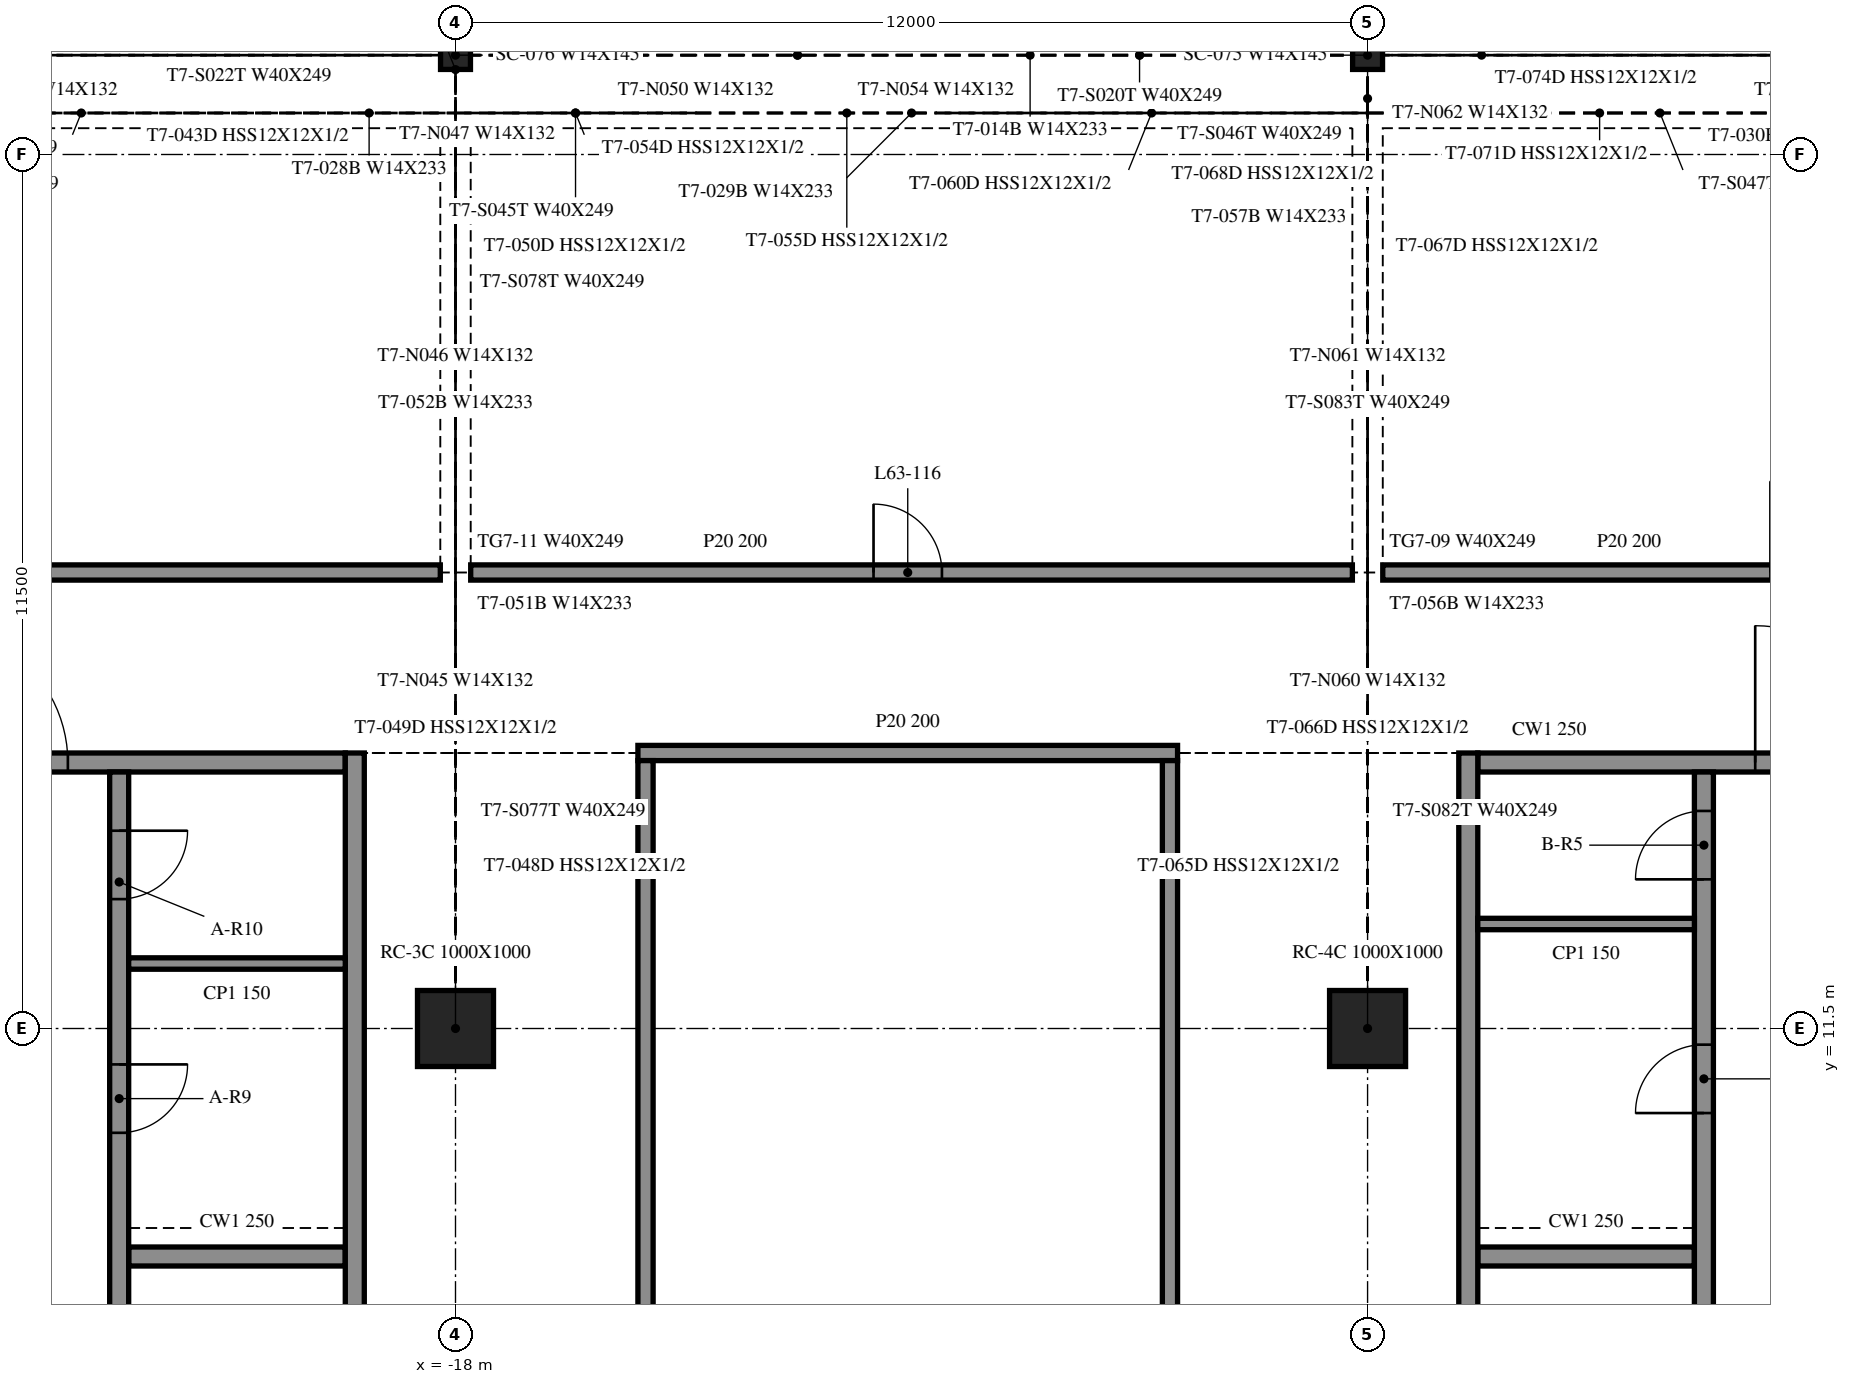
"""IFC4 building model, lengths in metres.
Left out: names, types, materials, properties, quantities, classifications, styles, units other than length and angle.
Written with IfcOpenShell. Run it as: python <this file> out.ifc"""

import sys

from ifc_helpers import new_model, si_unit, direction, frame, frame_2d, origin, origin_2d, place, context, subcontext, project, spatial, rectangle, i_section, extrude, element, fill, save


model = new_model("IFC4")
c1 = context("Model", 3, precision=1e-05, world=origin(), true_north=direction((0.0, 1.0)))
c2 = subcontext(c1, "Body", "Model", "MODEL_VIEW")
j1 = project(units=[si_unit("LENGTHUNIT", "METRE"), si_unit("PLANEANGLEUNIT", "RADIAN")], contexts=[c1])
p1 = place(None, origin())
s1 = spatial("IfcSite", under=j1, at=p1, CompositionType="ELEMENT")
p2 = place(p1, origin())
s2 = spatial("IfcBuilding", under=s1, at=p2, CompositionType="ELEMENT")
p3 = place(p2, frame((0.0, 0.0, 259.0)))
s3 = spatial("IfcBuildingStorey", under=s2, at=p3, CompositionType="ELEMENT", Elevation=259.0)
for number, where, z_axis, x_axis in (
    (1, (-18.0, 11.5, -0.4), (0.0, 0.0, 1.0), (1.0, 0.0, 0.0)),
    (2, (-6.0, 11.5, -0.4), (0.0, 0.0, 1.0), (1.0, 0.0, 0.0)),
):
    element("IfcColumn", number, at=place(p3, frame(where, z_axis=z_axis, x_axis=x_axis)), inside=s3, PredefinedType="COLUMN", context=c2, shape_type="SweptSolid", body=[
        extrude(rectangle(XDim=1.0, YDim=1.0, at=origin_2d()), origin(), (0.0, 0.0, 1.0), 4.36),
    ])
for number, where, z_axis, x_axis in (
    (3, (-6.0, 24.307, -0.4), (0.0, 0.0, 1.0), (1.0, 0.0, 0.0)),
    (4, (-18.0, 24.307, -0.4), (0.0, 0.0, 1.0), (1.0, 0.0, 0.0)),
):
    element("IfcColumn", number, at=place(p3, frame(where, z_axis=z_axis, x_axis=x_axis)), inside=s3, PredefinedType="COLUMN", context=c2, shape_type="SweptSolid", body=[
        extrude(i_section(OverallWidth=0.394, OverallDepth=0.376, WebThickness=0.017, FlangeThickness=0.028, at=origin_2d()), origin(), (0.0, 0.0, 1.0), 4.36),
    ])
p4 = place(p3, frame((-19.325, -9.125, 0.0), z_axis=(0.0, 0.0, 1.0), x_axis=(0.0, 1.0, 0.0)))
e5 = element("IfcWall", 5, at=p4, inside=s3, PredefinedType="SOLIDWALL", context=c2, shape_type="SweptSolid", body=[
    extrude(rectangle(XDim=24.25, YDim=0.25, at=frame_2d((12.125, 0.0))), origin(), (0.0, 0.0, 1.0), 3.96),
])
p5 = place(p3, frame((-28.55, 15.0, 0.0), z_axis=(0.0, 0.0, 1.0), x_axis=(1.0, 0.0, 0.0)))
e6 = element("IfcWall", 6, at=p5, inside=s3, PredefinedType="SOLIDWALL", context=c2, shape_type="SweptSolid", body=[
    extrude(rectangle(XDim=9.1, YDim=0.25, at=frame_2d((4.55, 0.0))), origin(), (0.0, 0.0, 1.0), 3.96),
])
p6 = place(p5, frame((3.65, 0.0, 0.0)))
e7 = element("IfcOpeningElement", 7, at=p6, cuts=e6, PredefinedType="OPENING", context=c2, shape_type="SweptSolid", body=[
    extrude(rectangle(XDim=1.8, YDim=2.1, at=frame_2d((0.9, 1.05))), frame((0.0, 0.135, 0.0), z_axis=(0.0, -1.0, 0.0), x_axis=(1.0, 0.0, 0.0)), (0.0, 0.0, 1.0), 0.27),
])
p7 = place(p3, frame((-22.425, 14.875, 0.0), z_axis=(0.0, 0.0, 1.0), x_axis=(0.0, -1.0, 0.0)))
e8 = element("IfcWall", 8, at=p7, inside=s3, PredefinedType="SOLIDWALL", context=c2, shape_type="SweptSolid", body=[
    extrude(rectangle(XDim=24.0, YDim=0.25, at=frame_2d((12.0, 0.0))), origin(), (0.0, 0.0, 1.0), 3.96),
])
p8 = place(p7, frame((15.225, 0.0, 0.0)))
e9 = element("IfcOpeningElement", 9, at=p8, cuts=e8, PredefinedType="OPENING", context=c2, shape_type="SweptSolid", body=[
    extrude(rectangle(XDim=0.9, YDim=2.1, at=frame_2d((0.45, 1.05))), frame((0.0, 0.135, 0.0), z_axis=(0.0, -1.0, 0.0), x_axis=(1.0, 0.0, 0.0)), (0.0, 0.0, 1.0), 0.27),
])
p9 = place(p7, frame((11.425, 0.0, 0.0)))
e10 = element("IfcOpeningElement", 10, at=p9, cuts=e8, PredefinedType="OPENING", context=c2, shape_type="SweptSolid", body=[
    extrude(rectangle(XDim=0.9, YDim=2.1, at=frame_2d((0.45, 1.05))), frame((0.0, 0.135, 0.0), z_axis=(0.0, -1.0, 0.0), x_axis=(1.0, 0.0, 0.0)), (0.0, 0.0, 1.0), 0.27),
])
p10 = place(p7, frame((7.625, 0.0, 0.0)))
e11 = element("IfcOpeningElement", 11, at=p10, cuts=e8, PredefinedType="OPENING", context=c2, shape_type="SweptSolid", body=[
    extrude(rectangle(XDim=0.9, YDim=2.1, at=frame_2d((0.45, 1.05))), frame((0.0, 0.135, 0.0), z_axis=(0.0, -1.0, 0.0), x_axis=(1.0, 0.0, 0.0)), (0.0, 0.0, 1.0), 0.27),
])
p11 = place(p7, frame((20.3, 0.0, 0.0)))
e12 = element("IfcOpeningElement", 12, at=p11, cuts=e8, PredefinedType="OPENING", context=c2, shape_type="SweptSolid", body=[
    extrude(rectangle(XDim=0.9, YDim=2.1, at=frame_2d((0.45, 1.05))), frame((0.0, 0.135, 0.0), z_axis=(0.0, -1.0, 0.0), x_axis=(1.0, 0.0, 0.0)), (0.0, 0.0, 1.0), 0.27),
])
p12 = place(p7, frame((3.847, 0.0, 0.0)))
e13 = element("IfcOpeningElement", 13, at=p12, cuts=e8, PredefinedType="OPENING", context=c2, shape_type="SweptSolid", body=[
    extrude(rectangle(XDim=0.9, YDim=2.1, at=frame_2d((0.45, 1.05))), frame((0.0, 0.135, 0.0), z_axis=(0.0, -1.0, 0.0), x_axis=(1.0, 0.0, 0.0)), (0.0, 0.0, 1.0), 0.27),
])
p13 = place(p7, frame((0.772, 0.0, 0.0)))
e14 = element("IfcOpeningElement", 14, at=p13, cuts=e8, PredefinedType="OPENING", context=c2, shape_type="SweptSolid", body=[
    extrude(rectangle(XDim=0.9, YDim=2.1, at=frame_2d((0.45, 1.05))), frame((0.0, 0.135, 0.0), z_axis=(0.0, -1.0, 0.0), x_axis=(1.0, 0.0, 0.0)), (0.0, 0.0, 1.0), 0.27),
])
p14 = place(p3, frame((-22.3, 8.5, 0.0), z_axis=(0.0, 0.0, 1.0), x_axis=(1.0, 0.0, 0.0)))
e15 = element("IfcWall", 15, at=p14, inside=s3, PredefinedType="SOLIDWALL", context=c2, shape_type="SweptSolid", body=[
    extrude(rectangle(XDim=2.85, YDim=0.25, at=frame_2d((1.425, 0.0))), origin(), (0.0, 0.0, 1.0), 3.96),
])
p15 = place(p3, frame((-22.3, 12.355, 0.0), z_axis=(0.0, 0.0, 1.0), x_axis=(1.0, 0.0, 0.0)))
e16 = element("IfcWall", 16, at=p15, inside=s3, PredefinedType="PARTITIONING", context=c2, shape_type="SweptSolid", body=[
    extrude(rectangle(XDim=2.85, YDim=0.15, at=frame_2d((1.425, 0.0))), origin(), (0.0, 0.0, 1.0), 3.96),
])
p16 = place(p3, frame((-4.675, 15.125, 0.0), z_axis=(0.0, 0.0, 1.0), x_axis=(0.0, -1.0, 0.0)))
e17 = element("IfcWall", 17, at=p16, inside=s3, PredefinedType="SOLIDWALL", context=c2, shape_type="SweptSolid", body=[
    extrude(rectangle(XDim=24.25, YDim=0.25, at=frame_2d((12.125, 0.0))), origin(), (0.0, 0.0, 1.0), 3.96),
])
p17 = place(p3, frame((-4.55, 15.0, 0.0), z_axis=(0.0, 0.0, 1.0), x_axis=(1.0, 0.0, 0.0)))
e18 = element("IfcWall", 18, at=p17, inside=s3, PredefinedType="SOLIDWALL", context=c2, shape_type="SweptSolid", body=[
    extrude(rectangle(XDim=9.1, YDim=0.25, at=frame_2d((4.55, 0.0))), origin(), (0.0, 0.0, 1.0), 3.96),
])
p18 = place(p17, frame((3.65, 0.0, 0.0)))
e19 = element("IfcOpeningElement", 19, at=p18, cuts=e18, PredefinedType="OPENING", context=c2, shape_type="SweptSolid", body=[
    extrude(rectangle(XDim=1.8, YDim=2.1, at=frame_2d((0.9, 1.05))), frame((0.0, 0.135, 0.0), z_axis=(0.0, -1.0, 0.0), x_axis=(1.0, 0.0, 0.0)), (0.0, 0.0, 1.0), 0.27),
])
p19 = place(p3, frame((-1.575, -9.125, 0.0), z_axis=(0.0, 0.0, 1.0), x_axis=(0.0, 1.0, 0.0)))
e20 = element("IfcWall", 20, at=p19, inside=s3, PredefinedType="SOLIDWALL", context=c2, shape_type="SweptSolid", body=[
    extrude(rectangle(XDim=24.0, YDim=0.25, at=frame_2d((12.0, 0.0))), origin(), (0.0, 0.0, 1.0), 3.96),
])
p20 = place(p19, frame((0.762, 0.0, 0.0)))
e21 = element("IfcOpeningElement", 21, at=p20, cuts=e20, PredefinedType="OPENING", context=c2, shape_type="SweptSolid", body=[
    extrude(rectangle(XDim=0.9, YDim=2.1, at=frame_2d((0.45, 1.05))), frame((0.0, 0.135, 0.0), z_axis=(0.0, -1.0, 0.0), x_axis=(1.0, 0.0, 0.0)), (0.0, 0.0, 1.0), 0.27),
])
p21 = place(p19, frame((2.8, 0.0, 0.0)))
e22 = element("IfcOpeningElement", 22, at=p21, cuts=e20, PredefinedType="OPENING", context=c2, shape_type="SweptSolid", body=[
    extrude(rectangle(XDim=0.9, YDim=2.1, at=frame_2d((0.45, 1.05))), frame((0.0, 0.135, 0.0), z_axis=(0.0, -1.0, 0.0), x_axis=(1.0, 0.0, 0.0)), (0.0, 0.0, 1.0), 0.27),
])
p22 = place(p19, frame((4.837, 0.0, 0.0)))
e23 = element("IfcOpeningElement", 23, at=p22, cuts=e20, PredefinedType="OPENING", context=c2, shape_type="SweptSolid", body=[
    extrude(rectangle(XDim=0.9, YDim=2.1, at=frame_2d((0.45, 1.05))), frame((0.0, 0.135, 0.0), z_axis=(0.0, -1.0, 0.0), x_axis=(1.0, 0.0, 0.0)), (0.0, 0.0, 1.0), 0.27),
])
p23 = place(p19, frame((19.512, 0.0, 0.0)))
e24 = element("IfcOpeningElement", 24, at=p23, cuts=e20, PredefinedType="OPENING", context=c2, shape_type="SweptSolid", body=[
    extrude(rectangle(XDim=0.9, YDim=2.1, at=frame_2d((0.45, 1.05))), frame((0.0, 0.135, 0.0), z_axis=(0.0, -1.0, 0.0), x_axis=(1.0, 0.0, 0.0)), (0.0, 0.0, 1.0), 0.27),
])
p24 = place(p19, frame((22.587, 0.0, 0.0)))
e25 = element("IfcOpeningElement", 25, at=p24, cuts=e20, PredefinedType="OPENING", context=c2, shape_type="SweptSolid", body=[
    extrude(rectangle(XDim=0.9, YDim=2.1, at=frame_2d((0.45, 1.05))), frame((0.0, 0.135, 0.0), z_axis=(0.0, -1.0, 0.0), x_axis=(1.0, 0.0, 0.0)), (0.0, 0.0, 1.0), 0.27),
])
p25 = place(p3, frame((-4.55, 8.5, 0.0), z_axis=(0.0, 0.0, 1.0), x_axis=(1.0, 0.0, 0.0)))
e26 = element("IfcWall", 26, at=p25, inside=s3, PredefinedType="SOLIDWALL", context=c2, shape_type="SweptSolid", body=[
    extrude(rectangle(XDim=2.85, YDim=0.25, at=frame_2d((1.425, 0.0))), origin(), (0.0, 0.0, 1.0), 3.96),
])
p26 = place(p3, frame((-4.55, 12.875, 0.0), z_axis=(0.0, 0.0, 1.0), x_axis=(1.0, 0.0, 0.0)))
e27 = element("IfcWall", 27, at=p26, inside=s3, PredefinedType="PARTITIONING", context=c2, shape_type="SweptSolid", body=[
    extrude(rectangle(XDim=2.85, YDim=0.15, at=frame_2d((1.425, 0.0))), origin(), (0.0, 0.0, 1.0), 3.96),
])
p27 = place(p3, frame((-15.6, 15.125, 0.0), z_axis=(0.0, 0.0, 1.0), x_axis=(1.0, 0.0, 0.0)))
e28 = element("IfcWall", 28, at=p27, inside=s3, PredefinedType="PARTITIONING", context=c2, shape_type="SweptSolid", body=[
    extrude(rectangle(XDim=7.1, YDim=0.2, at=frame_2d((3.55, 0.0))), origin(), (0.0, 0.0, 1.0), 3.96),
])
p28 = place(p3, frame((-29.8, 17.5, 0.0), z_axis=(0.0, 0.0, 1.0), x_axis=(1.0, 0.0, 0.0)))
e29 = element("IfcWall", 29, at=p28, inside=s3, PredefinedType="PARTITIONING", context=c2, shape_type="SweptSolid", body=[
    extrude(rectangle(XDim=11.6, YDim=0.2, at=frame_2d((5.8, 0.0))), origin(), (0.0, 0.0, 1.0), 3.96),
])
p29 = place(p28, frame((5.3, 0.0, 0.0)))
e30 = element("IfcOpeningElement", 30, at=p29, cuts=e29, PredefinedType="OPENING", context=c2, shape_type="SweptSolid", body=[
    extrude(rectangle(XDim=1.0, YDim=2.1, at=frame_2d((0.5, 1.05))), frame((0.0, 0.11, 0.0), z_axis=(0.0, -1.0, 0.0), x_axis=(1.0, 0.0, 0.0)), (0.0, 0.0, 1.0), 0.22),
])
p30 = place(p3, frame((-17.8, 17.5, 0.0), z_axis=(0.0, 0.0, 1.0), x_axis=(1.0, 0.0, 0.0)))
e31 = element("IfcWall", 31, at=p30, inside=s3, PredefinedType="PARTITIONING", context=c2, shape_type="SweptSolid", body=[
    extrude(rectangle(XDim=11.6, YDim=0.2, at=frame_2d((5.8, 0.0))), origin(), (0.0, 0.0, 1.0), 3.96),
])
p31 = place(p30, frame((5.3, 0.0, 0.0)))
e32 = element("IfcOpeningElement", 32, at=p31, cuts=e31, PredefinedType="OPENING", context=c2, shape_type="SweptSolid", body=[
    extrude(rectangle(XDim=0.9, YDim=2.1, at=frame_2d((0.45, 1.05))), frame((0.0, 0.11, 0.0), z_axis=(0.0, -1.0, 0.0), x_axis=(1.0, 0.0, 0.0)), (0.0, 0.0, 1.0), 0.22),
])
p32 = place(p3, frame((-5.8, 17.5, 0.0), z_axis=(0.0, 0.0, 1.0), x_axis=(1.0, 0.0, 0.0)))
e33 = element("IfcWall", 33, at=p32, inside=s3, PredefinedType="PARTITIONING", context=c2, shape_type="SweptSolid", body=[
    extrude(rectangle(XDim=11.6, YDim=0.2, at=frame_2d((5.8, 0.0))), origin(), (0.0, 0.0, 1.0), 3.96),
])
p33 = place(p32, frame((5.1, 0.0, 0.0)))
e34 = element("IfcOpeningElement", 34, at=p33, cuts=e33, PredefinedType="OPENING", context=c2, shape_type="SweptSolid", body=[
    extrude(rectangle(XDim=1.2, YDim=2.1, at=frame_2d((0.6, 1.05))), frame((0.0, 0.11, 0.0), z_axis=(0.0, -1.0, 0.0), x_axis=(1.0, 0.0, 0.0)), (0.0, 0.0, 1.0), 0.22),
])
for number, where, z_axis, x_axis in (
    (35, (-15.5, -9.025, 0.0), (0.0, 0.0, 1.0), (0.0, 1.0, 0.0)),
    (36, (-8.6, -9.025, 0.0), (0.0, 0.0, 1.0), (0.0, 1.0, 0.0)),
):
    element("IfcWall", number, at=place(p3, frame(where, z_axis=z_axis, x_axis=x_axis)), inside=s3, PredefinedType="PARTITIONING", context=c2, shape_type="SweptSolid", body=[
        extrude(rectangle(XDim=24.05, YDim=0.2, at=frame_2d((12.025, 0.0))), origin(), (0.0, 0.0, 1.0), 3.96),
    ])
p34 = place(p6, origin())
e37 = element("IfcDoor", 37, at=p34, inside=s3, OperationType="DOUBLE_DOOR_SINGLE_SWING", PredefinedType="DOOR", context=c2, shape_type="SweptSolid", body=[
    extrude(rectangle(XDim=1.8, YDim=2.1, at=frame_2d((0.9, 1.05))), frame((0.0, 0.025, 0.0), z_axis=(0.0, -1.0, 0.0), x_axis=(1.0, 0.0, 0.0)), (0.0, 0.0, 1.0), 0.05),
])
fill(e7, e37)
p35 = place(p12, origin())
e38 = element("IfcDoor", 38, at=p35, inside=s3, OperationType="SINGLE_SWING_LEFT", PredefinedType="DOOR", context=c2, shape_type="SweptSolid", body=[
    extrude(rectangle(XDim=0.9, YDim=2.1, at=frame_2d((0.45, 1.05))), frame((0.0, 0.025, 0.0), z_axis=(0.0, -1.0, 0.0), x_axis=(1.0, 0.0, 0.0)), (0.0, 0.0, 1.0), 0.05),
])
fill(e13, e38)
p36 = place(p13, origin())
e39 = element("IfcDoor", 39, at=p36, inside=s3, OperationType="SINGLE_SWING_RIGHT", PredefinedType="DOOR", context=c2, shape_type="SweptSolid", body=[
    extrude(rectangle(XDim=0.9, YDim=2.1, at=frame_2d((0.45, 1.05))), frame((0.0, 0.025, 0.0), z_axis=(0.0, -1.0, 0.0), x_axis=(1.0, 0.0, 0.0)), (0.0, 0.0, 1.0), 0.05),
])
fill(e14, e39)
p37 = place(p18, origin())
e40 = element("IfcDoor", 40, at=p37, inside=s3, OperationType="DOUBLE_DOOR_SINGLE_SWING", PredefinedType="DOOR", context=c2, shape_type="SweptSolid", body=[
    extrude(rectangle(XDim=1.8, YDim=2.1, at=frame_2d((0.9, 1.05))), frame((0.0, 0.025, 0.0), z_axis=(0.0, -1.0, 0.0), x_axis=(1.0, 0.0, 0.0)), (0.0, 0.0, 1.0), 0.05),
])
fill(e19, e40)
p38 = place(p23, origin())
e41 = element("IfcDoor", 41, at=p38, inside=s3, OperationType="SINGLE_SWING_RIGHT", PredefinedType="DOOR", context=c2, shape_type="SweptSolid", body=[
    extrude(rectangle(XDim=0.9, YDim=2.1, at=frame_2d((0.45, 1.05))), frame((0.0, 0.025, 0.0), z_axis=(0.0, -1.0, 0.0), x_axis=(1.0, 0.0, 0.0)), (0.0, 0.0, 1.0), 0.05),
])
fill(e24, e41)
p39 = place(p24, origin())
e42 = element("IfcDoor", 42, at=p39, inside=s3, OperationType="SINGLE_SWING_LEFT", PredefinedType="DOOR", context=c2, shape_type="SweptSolid", body=[
    extrude(rectangle(XDim=0.9, YDim=2.1, at=frame_2d((0.45, 1.05))), frame((0.0, 0.025, 0.0), z_axis=(0.0, -1.0, 0.0), x_axis=(1.0, 0.0, 0.0)), (0.0, 0.0, 1.0), 0.05),
])
fill(e25, e42)
p40 = place(p31, origin())
e43 = element("IfcDoor", 43, at=p40, inside=s3, OperationType="SINGLE_SWING_LEFT", PredefinedType="DOOR", context=c2, shape_type="SweptSolid", body=[
    extrude(rectangle(XDim=0.9, YDim=2.1, at=frame_2d((0.45, 1.05))), frame((0.0, 0.025, 0.0), z_axis=(0.0, -1.0, 0.0), x_axis=(1.0, 0.0, 0.0)), (0.0, 0.0, 1.0), 0.05),
])
fill(e32, e43)
save(model, sys.argv[1])
